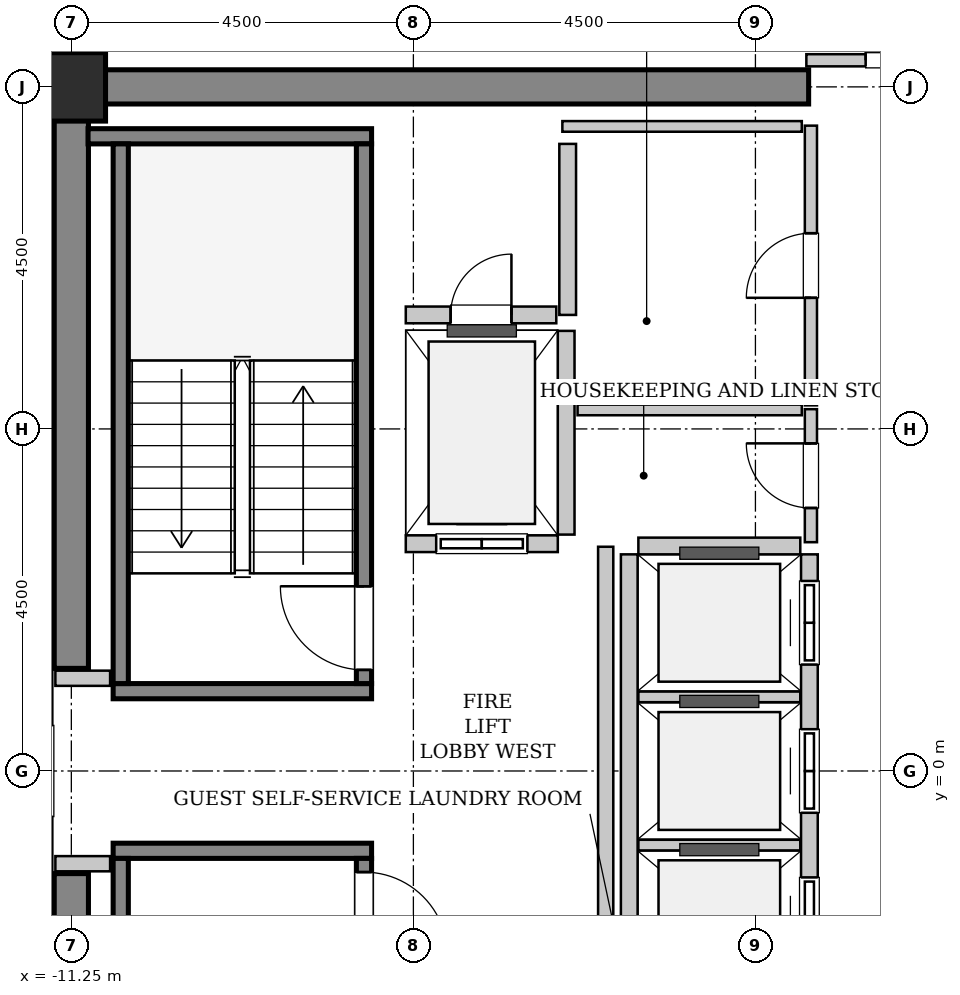
"""IFC4 building model, lengths in metres.
Left out: names, types, materials, properties, quantities, classifications, styles, units other than length and angle.
Written with IfcOpenShell. Run it as: python <this file> out.ifc"""

import sys

from ifc_helpers import new_model, si_unit, direction, frame, frame_2d, origin, origin_2d, place, context, subcontext, project, spatial, rectangle, extrude, source, transform, mapped, element, fill, save


model = new_model("IFC4")
c1 = context("Model", 3, precision=1e-05, world=origin(), true_north=direction((0.0, 1.0)))
c2 = subcontext(c1, "Body", "Model", "MODEL_VIEW")
j1 = project(units=[si_unit("LENGTHUNIT", "METRE"), si_unit("PLANEANGLEUNIT", "RADIAN")], contexts=[c1])
p1 = place(None, origin())
s1 = spatial("IfcSite", under=j1, at=p1, CompositionType="ELEMENT")
p2 = place(p1, origin())
s2 = spatial("IfcBuilding", under=s1, at=p2, CompositionType="ELEMENT")
p3 = place(p2, frame((0.0, 0.0, 310.2)))
s3 = spatial("IfcBuildingStorey", under=s2, at=p3, CompositionType="ELEMENT", Elevation=310.2)
m1 = source(origin(), c2, "Body", "SweptSolid", [
    extrude(rectangle(XDim=9.925, YDim=0.45, at=frame_2d((4.962, 0.0))), origin(), (0.0, 0.0, 1.0), 3.8),
])
p4 = place(p3, frame((-11.475, 9.0, 0.0), z_axis=(0.0, 0.0, 1.0), x_axis=(1.0, 0.0, 0.0)))
e1 = element("IfcWall", 1, at=p4, inside=s3, PredefinedType="SHEAR", context=c2, shape_type="MappedRepresentation", body=[
    mapped(m1, transform((0.0, 0.0, 0.0), x_axis=(1.0, 0.0, 0.0), y_axis=(0.0, 1.0, 0.0), z_axis=(0.0, 0.0, 1.0), scale=1.0)),
])
m2 = source(origin(), c2, "Body", "SweptSolid", [
    extrude(rectangle(XDim=7.425, YDim=0.45, at=frame_2d((3.712, 0.0))), origin(), (0.0, 0.0, 1.0), 3.8),
])
for number, where, z_axis, x_axis in (
    (2, (-11.25, -8.775, 0.0), (0.0, 0.0, 1.0), (0.0, 1.0, 0.0)),
    (3, (-11.25, 1.35, 0.0), (0.0, 0.0, 1.0), (0.0, 1.0, 0.0)),
):
    element("IfcWall", number, at=place(p3, frame(where, z_axis=z_axis, x_axis=x_axis)), inside=s3, PredefinedType="SHEAR", context=c2, shape_type="MappedRepresentation", body=[
        mapped(m2, transform((0.0, 0.0, 0.0), x_axis=(1.0, 0.0, 0.0), y_axis=(0.0, 1.0, 0.0), z_axis=(0.0, 0.0, 1.0), scale=1.0)),
    ])
m3 = source(origin(), c2, "Body", "SweptSolid", [
    extrude(rectangle(XDim=0.9, YDim=0.9, at=origin_2d()), origin(), (0.0, 0.0, 1.0), 3.8),
])
p5 = place(p3, frame((-11.25, 9.0, 0.0), z_axis=(0.0, 0.0, 1.0), x_axis=(1.0, 0.0, 0.0)))
e4 = element("IfcColumn", 4, at=p5, inside=s3, PredefinedType="COLUMN", context=c2, shape_type="MappedRepresentation", body=[
    mapped(m3, transform((0.0, 0.0, 0.0), x_axis=(1.0, 0.0, 0.0), y_axis=(0.0, 1.0, 0.0), z_axis=(0.0, 0.0, 1.0), scale=1.0)),
])
m4 = source(origin(), c2, "Body", "SweptSolid", [
    extrude(rectangle(XDim=3.4, YDim=0.2, at=frame_2d((1.7, 0.0))), origin(), (0.0, 0.0, 1.0), 3.8),
])
p6 = place(p3, frame((-7.3, 1.05, 0.0), z_axis=(0.0, 0.0, 1.0), x_axis=(-1.0, 0.0, 0.0)))
e5 = element("IfcWall", 5, at=p6, inside=s3, PredefinedType="SOLIDWALL", context=c2, shape_type="MappedRepresentation", body=[
    mapped(m4, transform((0.0, 0.0, 0.0), x_axis=(1.0, 0.0, 0.0), y_axis=(0.0, 1.0, 0.0), z_axis=(0.0, 0.0, 1.0), scale=1.0)),
])
m5 = source(origin(), c2, "Body", "SweptSolid", [
    extrude(rectangle(XDim=3.73, YDim=0.2, at=frame_2d((1.865, 0.0))), origin(), (0.0, 0.0, 1.0), 3.8),
])
p7 = place(p3, frame((-7.3, 8.35, 0.0), z_axis=(0.0, 0.0, 1.0), x_axis=(-1.0, 0.0, 0.0)))
e6 = element("IfcWall", 6, at=p7, inside=s3, PredefinedType="SOLIDWALL", context=c2, shape_type="MappedRepresentation", body=[
    mapped(m5, transform((0.0, 0.0, 0.0), x_axis=(1.0, 0.0, 0.0), y_axis=(0.0, 1.0, 0.0), z_axis=(0.0, 0.0, 1.0), scale=1.0)),
])
m6 = source(origin(), c2, "Body", "SweptSolid", [
    extrude(rectangle(XDim=7.1, YDim=0.2, at=frame_2d((3.55, 0.0))), origin(), (0.0, 0.0, 1.0), 3.8),
])
p8 = place(p3, frame((-7.4, 1.15, 0.0), z_axis=(0.0, 0.0, 1.0), x_axis=(0.0, 1.0, 0.0)))
e7 = element("IfcWall", 7, at=p8, inside=s3, PredefinedType="SOLIDWALL", context=c2, shape_type="MappedRepresentation", body=[
    mapped(m6, transform((0.0, 0.0, 0.0), x_axis=(1.0, 0.0, 0.0), y_axis=(0.0, 1.0, 0.0), z_axis=(0.0, 0.0, 1.0), scale=1.0)),
])
p9 = place(p8, frame((0.18, 0.0, 0.0)))
e8 = element("IfcOpeningElement", 8, at=p9, cuts=e7, PredefinedType="OPENING", context=c2, shape_type="SweptSolid", body=[
    extrude(rectangle(XDim=1.1, YDim=2.15, at=frame_2d((0.55, 1.075))), frame((0.0, 0.11, 0.0), z_axis=(0.0, -1.0, 0.0), x_axis=(1.0, 0.0, 0.0)), (0.0, 0.0, 1.0), 0.22),
])
p10 = place(p3, frame((-10.6, 1.15, 0.0), z_axis=(0.0, 0.0, 1.0), x_axis=(0.0, 1.0, 0.0)))
e9 = element("IfcWall", 9, at=p10, inside=s3, PredefinedType="SOLIDWALL", context=c2, shape_type="MappedRepresentation", body=[
    mapped(m6, transform((0.0, 0.0, 0.0), x_axis=(1.0, 0.0, 0.0), y_axis=(0.0, 1.0, 0.0), z_axis=(0.0, 0.0, 1.0), scale=1.0)),
])
p11 = place(p3, frame((-10.7, -1.05, 0.0), z_axis=(0.0, 0.0, 1.0), x_axis=(1.0, 0.0, 0.0)))
e10 = element("IfcWall", 10, at=p11, inside=s3, PredefinedType="SOLIDWALL", context=c2, shape_type="MappedRepresentation", body=[
    mapped(m4, transform((0.0, 0.0, 0.0), x_axis=(1.0, 0.0, 0.0), y_axis=(0.0, 1.0, 0.0), z_axis=(0.0, 0.0, 1.0), scale=1.0)),
])
p12 = place(p3, frame((-10.6, -1.15, 0.0), z_axis=(0.0, 0.0, 1.0), x_axis=(0.0, -1.0, 0.0)))
e11 = element("IfcWall", 11, at=p12, inside=s3, PredefinedType="SOLIDWALL", context=c2, shape_type="MappedRepresentation", body=[
    mapped(m6, transform((0.0, 0.0, 0.0), x_axis=(1.0, 0.0, 0.0), y_axis=(0.0, 1.0, 0.0), z_axis=(0.0, 0.0, 1.0), scale=1.0)),
])
p13 = place(p3, frame((-7.4, -1.15, 0.0), z_axis=(0.0, 0.0, 1.0), x_axis=(0.0, -1.0, 0.0)))
e12 = element("IfcWall", 12, at=p13, inside=s3, PredefinedType="SOLIDWALL", context=c2, shape_type="MappedRepresentation", body=[
    mapped(m6, transform((0.0, 0.0, 0.0), x_axis=(1.0, 0.0, 0.0), y_axis=(0.0, 1.0, 0.0), z_axis=(0.0, 0.0, 1.0), scale=1.0)),
])
p14 = place(p13, frame((0.18, 0.0, 0.0)))
e13 = element("IfcOpeningElement", 13, at=p14, cuts=e12, PredefinedType="OPENING", context=c2, shape_type="SweptSolid", body=[
    extrude(rectangle(XDim=1.1, YDim=2.15, at=frame_2d((0.55, 1.075))), frame((0.0, 0.11, 0.0), z_axis=(0.0, -1.0, 0.0), x_axis=(1.0, 0.0, 0.0)), (0.0, 0.0, 1.0), 0.22),
])
m7 = source(origin(), c2, "Body", "SweptSolid", [
    extrude(rectangle(XDim=2.0, YDim=0.22, at=frame_2d((1.0, 0.0))), origin(), (0.0, 0.0, 1.0), 3.535),
])
p15 = place(p3, frame((-6.85, 2.99, 0.0), z_axis=(0.0, 0.0, 1.0), x_axis=(1.0, 0.0, 0.0)))
e14 = element("IfcWall", 14, at=p15, inside=s3, PredefinedType="SOLIDWALL", context=c2, shape_type="MappedRepresentation", body=[
    mapped(m7, transform((0.0, 0.0, 0.0), x_axis=(1.0, 0.0, 0.0), y_axis=(0.0, 1.0, 0.0), z_axis=(0.0, 0.0, 1.0), scale=1.0)),
])
p16 = place(p15, frame((0.4, 0.0, 0.0)))
e15 = element("IfcOpeningElement", 15, at=p16, cuts=e14, PredefinedType="OPENING", context=c2, shape_type="SweptSolid", body=[
    extrude(rectangle(XDim=1.2, YDim=2.2, at=frame_2d((0.6, 1.1))), frame((0.0, 0.12, 0.0), z_axis=(0.0, -1.0, 0.0), x_axis=(1.0, 0.0, 0.0)), (0.0, 0.0, 1.0), 0.24),
])
m8 = source(origin(), c2, "Body", "SweptSolid", [
    extrude(rectangle(XDim=2.68, YDim=0.22, at=frame_2d((1.34, 0.0))), origin(), (0.0, 0.0, 1.0), 3.535),
])
p17 = place(p3, frame((-4.74, 3.11, 0.0), z_axis=(0.0, 0.0, 1.0), x_axis=(0.0, 1.0, 0.0)))
e16 = element("IfcWall", 16, at=p17, inside=s3, PredefinedType="SOLIDWALL", context=c2, shape_type="MappedRepresentation", body=[
    mapped(m8, transform((0.0, 0.0, 0.0), x_axis=(1.0, 0.0, 0.0), y_axis=(0.0, 1.0, 0.0), z_axis=(0.0, 0.0, 1.0), scale=1.0)),
])
m9 = source(origin(), c2, "Body", "SweptSolid", [
    extrude(rectangle(XDim=5.7, YDim=0.22, at=frame_2d((2.85, 0.0))), origin(), (0.0, 0.0, 1.0), 3.535),
])
p18 = place(p3, frame((-1.54, -2.85, 0.0), z_axis=(0.0, 0.0, 1.0), x_axis=(0.0, 1.0, 0.0)))
e17 = element("IfcWall", 17, at=p18, inside=s3, PredefinedType="SOLIDWALL", context=c2, shape_type="MappedRepresentation", body=[
    mapped(m9, transform((0.0, 0.0, 0.0), x_axis=(1.0, 0.0, 0.0), y_axis=(0.0, 1.0, 0.0), z_axis=(0.0, 0.0, 1.0), scale=1.0)),
])
p19 = place(p18, frame((0.35, 0.0, 0.0)))
e18 = element("IfcOpeningElement", 18, at=p19, cuts=e17, PredefinedType="OPENING", context=c2, shape_type="SweptSolid", body=[
    extrude(rectangle(XDim=1.1, YDim=2.2, at=frame_2d((0.55, 1.1))), frame((0.0, 0.12, 0.0), z_axis=(0.0, -1.0, 0.0), x_axis=(1.0, 0.0, 0.0)), (0.0, 0.0, 1.0), 0.24),
])
p20 = place(p18, frame((2.3, 0.0, 0.0)))
e19 = element("IfcOpeningElement", 19, at=p20, cuts=e17, PredefinedType="OPENING", context=c2, shape_type="SweptSolid", body=[
    extrude(rectangle(XDim=1.1, YDim=2.2, at=frame_2d((0.55, 1.1))), frame((0.0, 0.12, 0.0), z_axis=(0.0, -1.0, 0.0), x_axis=(1.0, 0.0, 0.0)), (0.0, 0.0, 1.0), 0.24),
])
p21 = place(p18, frame((4.25, 0.0, 0.0)))
e20 = element("IfcOpeningElement", 20, at=p21, cuts=e17, PredefinedType="OPENING", context=c2, shape_type="SweptSolid", body=[
    extrude(rectangle(XDim=1.1, YDim=2.2, at=frame_2d((0.55, 1.1))), frame((0.0, 0.12, 0.0), z_axis=(0.0, -1.0, 0.0), x_axis=(1.0, 0.0, 0.0)), (0.0, 0.0, 1.0), 0.24),
])
p22 = place(p3, frame((-3.91, 2.85, 0.0), z_axis=(0.0, 0.0, 1.0), x_axis=(0.0, -1.0, 0.0)))
e21 = element("IfcWall", 21, at=p22, inside=s3, PredefinedType="SOLIDWALL", context=c2, shape_type="MappedRepresentation", body=[
    mapped(m9, transform((0.0, 0.0, 0.0), x_axis=(1.0, 0.0, 0.0), y_axis=(0.0, 1.0, 0.0), z_axis=(0.0, 0.0, 1.0), scale=1.0)),
])
m10 = source(origin(), c2, "Body", "SweptSolid", [
    extrude(rectangle(XDim=2.13, YDim=0.14, at=frame_2d((1.065, 0.0))), origin(), (0.0, 0.0, 1.0), 3.535),
])
for number, where, z_axis, x_axis in (
    (22, (-3.79, -0.975, 0.0), (0.0, 0.0, 1.0), (1.0, 0.0, 0.0)),
    (23, (-3.79, 0.975, 0.0), (0.0, 0.0, 1.0), (1.0, 0.0, 0.0)),
):
    element("IfcWall", number, at=place(p3, frame(where, z_axis=z_axis, x_axis=x_axis)), inside=s3, PredefinedType="PARTITIONING", context=c2, shape_type="MappedRepresentation", body=[
        mapped(m10, transform((0.0, 0.0, 0.0), x_axis=(1.0, 0.0, 0.0), y_axis=(0.0, 1.0, 0.0), z_axis=(0.0, 0.0, 1.0), scale=1.0)),
    ])
m11 = source(origin(), c2, "Body", "SweptSolid", [
    extrude(rectangle(XDim=2.13, YDim=0.22, at=frame_2d((1.065, 0.0))), origin(), (0.0, 0.0, 1.0), 3.535),
])
p23 = place(p3, frame((-1.66, 2.96, 0.0), z_axis=(0.0, 0.0, 1.0), x_axis=(-1.0, 0.0, 0.0)))
e24 = element("IfcWall", 24, at=p23, inside=s3, PredefinedType="SOLIDWALL", context=c2, shape_type="MappedRepresentation", body=[
    mapped(m11, transform((0.0, 0.0, 0.0), x_axis=(1.0, 0.0, 0.0), y_axis=(0.0, 1.0, 0.0), z_axis=(0.0, 0.0, 1.0), scale=1.0)),
])
m12 = source(origin(), c2, "Body", "SweptSolid", [
    extrude(rectangle(XDim=2.25, YDim=0.22, at=frame_2d((1.125, 0.0))), origin(), (0.0, 0.0, 1.0), 3.535),
])
p24 = place(p3, frame((-4.72, 6.0, 0.0), z_axis=(0.0, 0.0, 1.0), x_axis=(0.0, 1.0, 0.0)))
e25 = element("IfcWall", 25, at=p24, inside=s3, PredefinedType="SOLIDWALL", context=c2, shape_type="MappedRepresentation", body=[
    mapped(m12, transform((0.0, 0.0, 0.0), x_axis=(1.0, 0.0, 0.0), y_axis=(0.0, 1.0, 0.0), z_axis=(0.0, 0.0, 1.0), scale=1.0)),
])
m13 = source(origin(), c2, "Body", "SweptSolid", [
    extrude(rectangle(XDim=1.98, YDim=0.22, at=frame_2d((0.99, 0.0))), origin(), (0.0, 0.0, 1.0), 3.535),
])
p25 = place(p3, frame((-6.85, 6.0, 0.0), z_axis=(0.0, 0.0, 1.0), x_axis=(1.0, 0.0, 0.0)))
e26 = element("IfcWall", 26, at=p25, inside=s3, PredefinedType="SOLIDWALL", context=c2, shape_type="MappedRepresentation", body=[
    mapped(m13, transform((0.0, 0.0, 0.0), x_axis=(1.0, 0.0, 0.0), y_axis=(0.0, 1.0, 0.0), z_axis=(0.0, 0.0, 1.0), scale=1.0)),
])
p26 = place(p25, frame((0.59, 0.0, 0.0)))
e27 = element("IfcOpeningElement", 27, at=p26, cuts=e26, PredefinedType="OPENING", context=c2, shape_type="SweptSolid", body=[
    extrude(rectangle(XDim=0.8, YDim=2.0, at=frame_2d((0.4, 1.0))), frame((0.0, 0.12, 0.0), z_axis=(0.0, -1.0, 0.0), x_axis=(1.0, 0.0, 0.0)), (0.0, 0.0, 1.0), 0.24),
])
m14 = source(origin(), c2, "Body", "SweptSolid", [
    extrude(rectangle(XDim=5.9, YDim=0.2, at=frame_2d((2.95, 0.0))), origin(), (0.0, 0.0, 1.0), 3.535),
])
p27 = place(p3, frame((-4.22, -2.95, 0.0), z_axis=(0.0, 0.0, 1.0), x_axis=(0.0, 1.0, 0.0)))
e28 = element("IfcWall", 28, at=p27, inside=s3, PredefinedType="PARTITIONING", context=c2, shape_type="MappedRepresentation", body=[
    mapped(m14, transform((0.0, 0.0, 0.0), x_axis=(1.0, 0.0, 0.0), y_axis=(0.0, 1.0, 0.0), z_axis=(0.0, 0.0, 1.0), scale=1.0)),
])
m15 = source(origin(), c2, "Body", "SweptSolid", [
    extrude(rectangle(XDim=0.72, YDim=0.2, at=frame_2d((0.36, 0.0))), origin(), (0.0, 0.0, 1.0), 3.535),
])
for number, where, z_axis, x_axis in (
    (29, (-11.46, 1.22, 0.0), (0.0, 0.0, 1.0), (1.0, 0.0, 0.0)),
    (30, (-11.46, -1.22, 0.0), (0.0, 0.0, 1.0), (1.0, 0.0, 0.0)),
):
    element("IfcWall", number, at=place(p3, frame(where, z_axis=z_axis, x_axis=x_axis)), inside=s3, PredefinedType="PARTITIONING", context=c2, shape_type="MappedRepresentation", body=[
        mapped(m15, transform((0.0, 0.0, 0.0), x_axis=(1.0, 0.0, 0.0), y_axis=(0.0, 1.0, 0.0), z_axis=(0.0, 0.0, 1.0), scale=1.0)),
    ])
m16 = source(origin(), c2, "Body", "SweptSolid", [
    extrude(rectangle(XDim=3.16, YDim=0.16, at=frame_2d((1.58, 0.0))), origin(), (0.0, 0.0, 1.0), 2.625),
])
p28 = place(p3, frame((-1.58, 9.35, 0.0), z_axis=(0.0, 0.0, 1.0), x_axis=(1.0, 0.0, 0.0)))
e31 = element("IfcWall", 31, at=p28, inside=s3, PredefinedType="PARTITIONING", context=c2, shape_type="MappedRepresentation", body=[
    mapped(m16, transform((0.0, 0.0, 0.0), x_axis=(1.0, 0.0, 0.0), y_axis=(0.0, 1.0, 0.0), z_axis=(0.0, 0.0, 1.0), scale=1.0)),
])
p29 = place(p28, frame((0.78, 0.0, 0.0)))
e32 = element("IfcOpeningElement", 32, at=p29, cuts=e31, PredefinedType="OPENING", context=c2, shape_type="SweptSolid", body=[
    extrude(rectangle(XDim=1.6, YDim=2.3, at=frame_2d((0.8, 1.15))), frame((0.0, 0.09, 0.0), z_axis=(0.0, -1.0, 0.0), x_axis=(1.0, 0.0, 0.0)), (0.0, 0.0, 1.0), 0.18),
])
m17 = source(origin(), c2, "Body", "SweptSolid", [
    extrude(rectangle(XDim=1.75, YDim=0.16, at=frame_2d((0.875, 0.0))), origin(), (0.0, 0.0, 1.0), 3.535),
])
p30 = place(p3, frame((-1.52, 3.01, 0.0), z_axis=(0.0, 0.0, 1.0), x_axis=(0.0, 1.0, 0.0)))
e33 = element("IfcWall", 33, at=p30, inside=s3, PredefinedType="PARTITIONING", context=c2, shape_type="MappedRepresentation", body=[
    mapped(m17, transform((0.0, 0.0, 0.0), x_axis=(1.0, 0.0, 0.0), y_axis=(0.0, 1.0, 0.0), z_axis=(0.0, 0.0, 1.0), scale=1.0)),
])
p31 = place(p30, frame((0.45, 0.0, 0.0)))
e34 = element("IfcOpeningElement", 34, at=p31, cuts=e33, PredefinedType="OPENING", context=c2, shape_type="SweptSolid", body=[
    extrude(rectangle(XDim=0.85, YDim=2.1, at=frame_2d((0.425, 1.05))), frame((0.0, 0.09, 0.0), z_axis=(0.0, -1.0, 0.0), x_axis=(1.0, 0.0, 0.0)), (0.0, 0.0, 1.0), 0.18),
])
m18 = source(origin(), c2, "Body", "SweptSolid", [
    extrude(rectangle(XDim=2.95, YDim=0.14, at=frame_2d((1.475, 0.0))), origin(), (0.0, 0.0, 1.0), 3.535),
])
p32 = place(p3, frame((-4.59, 4.75, 0.0), z_axis=(0.0, 0.0, 1.0), x_axis=(1.0, 0.0, 0.0)))
e35 = element("IfcWall", 35, at=p32, inside=s3, PredefinedType="PARTITIONING", context=c2, shape_type="MappedRepresentation", body=[
    mapped(m18, transform((0.0, 0.0, 0.0), x_axis=(1.0, 0.0, 0.0), y_axis=(0.0, 1.0, 0.0), z_axis=(0.0, 0.0, 1.0), scale=1.0)),
])
m19 = source(origin(), c2, "Body", "SweptSolid", [
    extrude(rectangle(XDim=3.68, YDim=0.16, at=frame_2d((1.84, 0.0))), origin(), (0.0, 0.0, 1.0), 3.535),
])
p33 = place(p3, frame((-1.52, 4.81, 0.0), z_axis=(0.0, 0.0, 1.0), x_axis=(0.0, 1.0, 0.0)))
e36 = element("IfcWall", 36, at=p33, inside=s3, PredefinedType="PARTITIONING", context=c2, shape_type="MappedRepresentation", body=[
    mapped(m19, transform((0.0, 0.0, 0.0), x_axis=(1.0, 0.0, 0.0), y_axis=(0.0, 1.0, 0.0), z_axis=(0.0, 0.0, 1.0), scale=1.0)),
])
p34 = place(p33, frame((1.415, 0.0, 0.0)))
e37 = element("IfcOpeningElement", 37, at=p34, cuts=e36, PredefinedType="OPENING", context=c2, shape_type="SweptSolid", body=[
    extrude(rectangle(XDim=0.85, YDim=2.1, at=frame_2d((0.425, 1.05))), frame((0.0, 0.09, 0.0), z_axis=(0.0, -1.0, 0.0), x_axis=(1.0, 0.0, 0.0)), (0.0, 0.0, 1.0), 0.18),
])
m20 = source(origin(), c2, "Body", "SweptSolid", [
    extrude(rectangle(XDim=3.15, YDim=0.14, at=frame_2d((1.575, 0.0))), origin(), (0.0, 0.0, 1.0), 3.535),
])
p35 = place(p3, frame((-4.79, 8.48, 0.0), z_axis=(0.0, 0.0, 1.0), x_axis=(1.0, 0.0, 0.0)))
e38 = element("IfcWall", 38, at=p35, inside=s3, PredefinedType="PARTITIONING", context=c2, shape_type="MappedRepresentation", body=[
    mapped(m20, transform((0.0, 0.0, 0.0), x_axis=(1.0, 0.0, 0.0), y_axis=(0.0, 1.0, 0.0), z_axis=(0.0, 0.0, 1.0), scale=1.0)),
])
m21 = source(origin(), c2, "Body", "SweptSolid", [
    extrude(rectangle(XDim=1.1, YDim=2.15, at=frame_2d((0.55, 1.075))), frame((0.0, 0.025, 0.0), z_axis=(0.0, -1.0, 0.0), x_axis=(1.0, 0.0, 0.0)), (0.0, 0.0, 1.0), 0.05),
])
p36 = place(p9, origin())
e39 = element("IfcDoor", 39, at=p36, inside=s3, OperationType="SINGLE_SWING_RIGHT", PredefinedType="DOOR", context=c2, shape_type="MappedRepresentation", body=[
    mapped(m21, transform((0.0, 0.0, 0.0), x_axis=(1.0, 0.0, 0.0), y_axis=(0.0, 1.0, 0.0), z_axis=(0.0, 0.0, 1.0), scale=1.0)),
])
fill(e8, e39)
p37 = place(p14, origin())
e40 = element("IfcDoor", 40, at=p37, inside=s3, OperationType="SINGLE_SWING_RIGHT", PredefinedType="DOOR", context=c2, shape_type="MappedRepresentation", body=[
    mapped(m21, transform((0.0, 0.0, 0.0), x_axis=(1.0, 0.0, 0.0), y_axis=(0.0, 1.0, 0.0), z_axis=(0.0, 0.0, 1.0), scale=1.0)),
])
fill(e13, e40)
m22 = source(origin(), c2, "Body", "SweptSolid", [
    extrude(rectangle(XDim=1.2, YDim=2.2, at=frame_2d((0.6, 1.1))), frame((0.0, 0.025, 0.0), z_axis=(0.0, -1.0, 0.0), x_axis=(1.0, 0.0, 0.0)), (0.0, 0.0, 1.0), 0.05),
])
p38 = place(p16, origin())
e41 = element("IfcDoor", 41, at=p38, inside=s3, OperationType="SLIDING_TO_LEFT", PredefinedType="DOOR", context=c2, shape_type="MappedRepresentation", body=[
    mapped(m22, transform((0.0, 0.0, 0.0), x_axis=(1.0, 0.0, 0.0), y_axis=(0.0, 1.0, 0.0), z_axis=(0.0, 0.0, 1.0), scale=1.0)),
])
fill(e15, e41)
m23 = source(origin(), c2, "Body", "SweptSolid", [
    extrude(rectangle(XDim=1.1, YDim=2.2, at=frame_2d((0.55, 1.1))), frame((0.0, 0.025, 0.0), z_axis=(0.0, -1.0, 0.0), x_axis=(1.0, 0.0, 0.0)), (0.0, 0.0, 1.0), 0.05),
])
p39 = place(p19, origin())
e42 = element("IfcDoor", 42, at=p39, inside=s3, OperationType="DOUBLE_DOOR_SLIDING", PredefinedType="DOOR", context=c2, shape_type="MappedRepresentation", body=[
    mapped(m23, transform((0.0, 0.0, 0.0), x_axis=(1.0, 0.0, 0.0), y_axis=(0.0, 1.0, 0.0), z_axis=(0.0, 0.0, 1.0), scale=1.0)),
])
fill(e18, e42)
p40 = place(p20, origin())
e43 = element("IfcDoor", 43, at=p40, inside=s3, OperationType="DOUBLE_DOOR_SLIDING", PredefinedType="DOOR", context=c2, shape_type="MappedRepresentation", body=[
    mapped(m23, transform((0.0, 0.0, 0.0), x_axis=(1.0, 0.0, 0.0), y_axis=(0.0, 1.0, 0.0), z_axis=(0.0, 0.0, 1.0), scale=1.0)),
])
fill(e19, e43)
p41 = place(p21, origin())
e44 = element("IfcDoor", 44, at=p41, inside=s3, OperationType="DOUBLE_DOOR_SLIDING", PredefinedType="DOOR", context=c2, shape_type="MappedRepresentation", body=[
    mapped(m23, transform((0.0, 0.0, 0.0), x_axis=(1.0, 0.0, 0.0), y_axis=(0.0, 1.0, 0.0), z_axis=(0.0, 0.0, 1.0), scale=1.0)),
])
fill(e20, e44)
m24 = source(origin(), c2, "Body", "SweptSolid", [
    extrude(rectangle(XDim=0.8, YDim=2.0, at=frame_2d((0.4, 1.0))), frame((0.0, 0.025, 0.0), z_axis=(0.0, -1.0, 0.0), x_axis=(1.0, 0.0, 0.0)), (0.0, 0.0, 1.0), 0.05),
])
p42 = place(p26, origin())
e45 = element("IfcDoor", 45, at=p42, inside=s3, OperationType="SINGLE_SWING_RIGHT", PredefinedType="TRAPDOOR", context=c2, shape_type="MappedRepresentation", body=[
    mapped(m24, transform((0.0, 0.0, 0.0), x_axis=(1.0, 0.0, 0.0), y_axis=(0.0, 1.0, 0.0), z_axis=(0.0, 0.0, 1.0), scale=1.0)),
])
fill(e27, e45)
m25 = source(origin(), c2, "Body", "SweptSolid", [
    extrude(rectangle(XDim=1.6, YDim=2.3, at=frame_2d((0.8, 1.15))), frame((0.0, 0.025, 0.0), z_axis=(0.0, -1.0, 0.0), x_axis=(1.0, 0.0, 0.0)), (0.0, 0.0, 1.0), 0.05),
])
p43 = place(p29, origin())
e46 = element("IfcDoor", 46, at=p43, inside=s3, OperationType="DOUBLE_DOOR_SINGLE_SWING", PredefinedType="DOOR", context=c2, shape_type="MappedRepresentation", body=[
    mapped(m25, transform((0.0, 0.0, 0.0), x_axis=(1.0, 0.0, 0.0), y_axis=(0.0, 1.0, 0.0), z_axis=(0.0, 0.0, 1.0), scale=1.0)),
])
fill(e32, e46)
m26 = source(origin(), c2, "Body", "SweptSolid", [
    extrude(rectangle(XDim=0.85, YDim=2.1, at=frame_2d((0.425, 1.05))), frame((0.0, 0.025, 0.0), z_axis=(0.0, -1.0, 0.0), x_axis=(1.0, 0.0, 0.0)), (0.0, 0.0, 1.0), 0.05),
])
p44 = place(p31, origin())
e47 = element("IfcDoor", 47, at=p44, inside=s3, OperationType="SINGLE_SWING_RIGHT", PredefinedType="DOOR", context=c2, shape_type="MappedRepresentation", body=[
    mapped(m26, transform((0.0, 0.0, 0.0), x_axis=(1.0, 0.0, 0.0), y_axis=(0.0, 1.0, 0.0), z_axis=(0.0, 0.0, 1.0), scale=1.0)),
])
fill(e34, e47)
p45 = place(p34, origin())
e48 = element("IfcDoor", 48, at=p45, inside=s3, OperationType="SINGLE_SWING_LEFT", PredefinedType="DOOR", context=c2, shape_type="MappedRepresentation", body=[
    mapped(m26, transform((0.0, 0.0, 0.0), x_axis=(1.0, 0.0, 0.0), y_axis=(0.0, 1.0, 0.0), z_axis=(0.0, 0.0, 1.0), scale=1.0)),
])
fill(e37, e48)
save(model, sys.argv[1])
